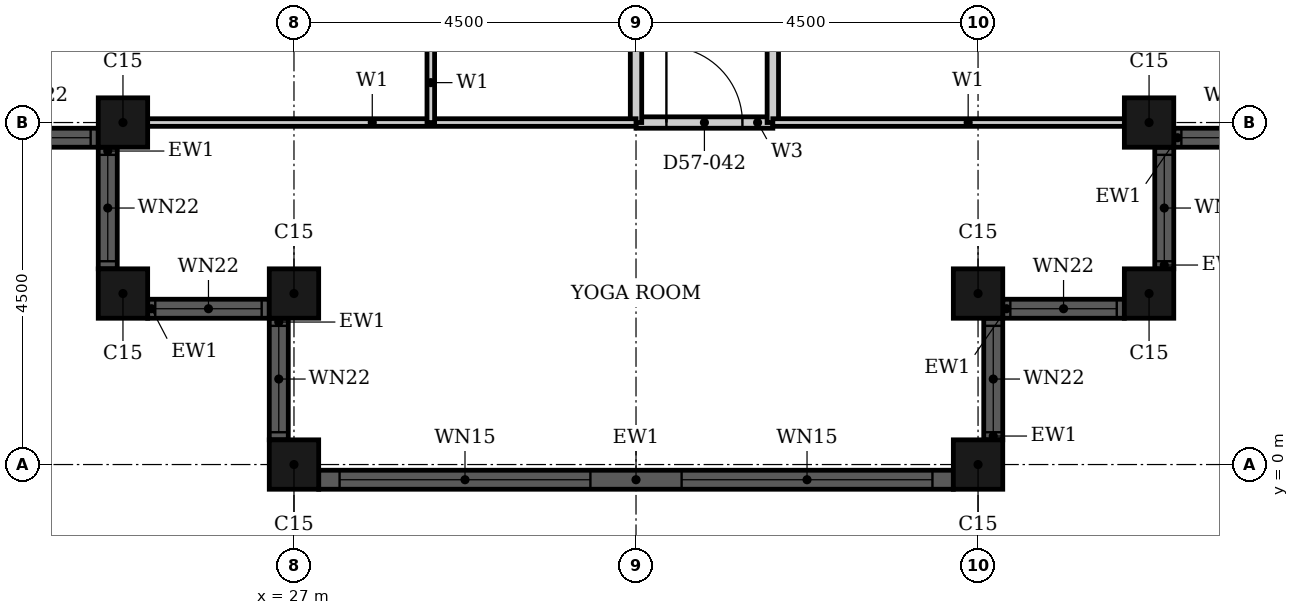
"""IFC4 building model, lengths in metres.
Left out: names, types, materials, properties, quantities, classifications, styles, units other than length and angle.
Written with IfcOpenShell. Run it as: python <this file> out.ifc"""

import sys

from ifc_helpers import new_model, si_unit, direction, frame, frame_2d, origin, origin_2d, place, context, subcontext, project, spatial, rectangle, hollow_rectangle, extrude, element, fill, save


model = new_model("IFC4")
c1 = context("Model", 3, precision=1e-05, world=origin(), true_north=direction((0.0, 1.0)))
c2 = subcontext(c1, "Body", "Model", "MODEL_VIEW")
j1 = project(units=[si_unit("LENGTHUNIT", "METRE"), si_unit("PLANEANGLEUNIT", "RADIAN")], contexts=[c1])
p1 = place(None, origin())
s1 = spatial("IfcSite", under=j1, at=p1, CompositionType="ELEMENT")
p2 = place(p1, origin())
s2 = spatial("IfcBuilding", under=s1, at=p2, CompositionType="ELEMENT")
p3 = place(p2, frame((0.0, 0.0, 225.7)))
s3 = spatial("IfcBuildingStorey", under=s2, at=p3, CompositionType="ELEMENT", Elevation=225.7)
for number, where, z_axis, x_axis in (
    (1, (24.75, 4.5, 0.0), (0.0, 0.0, 1.0), (1.0, 0.0, 0.0)),
    (2, (24.75, 2.25, 0.0), (0.0, 0.0, 1.0), (1.0, 0.0, 0.0)),
    (3, (27.0, 2.25, 0.0), (0.0, 0.0, 1.0), (1.0, 0.0, 0.0)),
    (4, (27.0, 0.0, 0.0), (0.0, 0.0, 1.0), (1.0, 0.0, 0.0)),
    (5, (36.0, 0.0, 0.0), (0.0, 0.0, 1.0), (1.0, 0.0, 0.0)),
    (6, (36.0, 2.25, 0.0), (0.0, 0.0, 1.0), (1.0, 0.0, 0.0)),
    (7, (38.25, 2.25, 0.0), (0.0, 0.0, 1.0), (1.0, 0.0, 0.0)),
    (8, (38.25, 4.5, 0.0), (0.0, 0.0, 1.0), (1.0, 0.0, 0.0)),
):
    element("IfcColumn", number, at=place(p3, frame(where, z_axis=z_axis, x_axis=x_axis)), inside=s3, PredefinedType="COLUMN", context=c2, shape_type="SweptSolid", body=[
        extrude(hollow_rectangle(XDim=0.65, YDim=0.65, WallThickness=0.021, at=origin_2d()), origin(), (0.0, 0.0, 1.0), 3.7),
    ])
p4 = place(p3, frame((22.825, 4.3, 0.0), z_axis=(0.0, 0.0, 1.0), x_axis=(1.0, 0.0, 0.0)))
e9 = element("IfcWall", 9, at=p4, inside=s3, PredefinedType="SOLIDWALL", context=c2, shape_type="SweptSolid", body=[
    extrude(rectangle(XDim=1.6, YDim=0.25, at=frame_2d((0.8, 0.0))), origin(), (0.0, 0.0, 1.0), 3.7),
])
p5 = place(p4, frame((0.1, 0.0, 0.9)))
e10 = element("IfcOpeningElement", 10, at=p5, cuts=e9, PredefinedType="OPENING", context=c2, shape_type="SweptSolid", body=[
    extrude(rectangle(XDim=1.4, YDim=1.85, at=frame_2d((0.7, 0.925))), frame((0.0, 0.135, 0.0), z_axis=(0.0, -1.0, 0.0), x_axis=(1.0, 0.0, 0.0)), (0.0, 0.0, 1.0), 0.27),
])
p6 = place(p3, frame((24.55, 4.175, 0.0), z_axis=(0.0, 0.0, 1.0), x_axis=(0.0, -1.0, 0.0)))
e11 = element("IfcWall", 11, at=p6, inside=s3, PredefinedType="SOLIDWALL", context=c2, shape_type="SweptSolid", body=[
    extrude(rectangle(XDim=1.6, YDim=0.25, at=frame_2d((0.8, 0.0))), origin(), (0.0, 0.0, 1.0), 3.7),
])
p7 = place(p6, frame((0.1, 0.0, 0.9)))
e12 = element("IfcOpeningElement", 12, at=p7, cuts=e11, PredefinedType="OPENING", context=c2, shape_type="SweptSolid", body=[
    extrude(rectangle(XDim=1.4, YDim=1.85, at=frame_2d((0.7, 0.925))), frame((0.0, 0.135, 0.0), z_axis=(0.0, -1.0, 0.0), x_axis=(1.0, 0.0, 0.0)), (0.0, 0.0, 1.0), 0.27),
])
p8 = place(p3, frame((25.075, 2.05, 0.0), z_axis=(0.0, 0.0, 1.0), x_axis=(1.0, 0.0, 0.0)))
e13 = element("IfcWall", 13, at=p8, inside=s3, PredefinedType="SOLIDWALL", context=c2, shape_type="SweptSolid", body=[
    extrude(rectangle(XDim=1.6, YDim=0.25, at=frame_2d((0.8, 0.0))), origin(), (0.0, 0.0, 1.0), 3.7),
])
p9 = place(p8, frame((0.1, 0.0, 0.9)))
e14 = element("IfcOpeningElement", 14, at=p9, cuts=e13, PredefinedType="OPENING", context=c2, shape_type="SweptSolid", body=[
    extrude(rectangle(XDim=1.4, YDim=1.85, at=frame_2d((0.7, 0.925))), frame((0.0, 0.135, 0.0), z_axis=(0.0, -1.0, 0.0), x_axis=(1.0, 0.0, 0.0)), (0.0, 0.0, 1.0), 0.27),
])
p10 = place(p3, frame((26.8, 1.925, 0.0), z_axis=(0.0, 0.0, 1.0), x_axis=(0.0, -1.0, 0.0)))
e15 = element("IfcWall", 15, at=p10, inside=s3, PredefinedType="SOLIDWALL", context=c2, shape_type="SweptSolid", body=[
    extrude(rectangle(XDim=1.6, YDim=0.25, at=frame_2d((0.8, 0.0))), origin(), (0.0, 0.0, 1.0), 3.7),
])
p11 = place(p10, frame((0.1, 0.0, 0.9)))
e16 = element("IfcOpeningElement", 16, at=p11, cuts=e15, PredefinedType="OPENING", context=c2, shape_type="SweptSolid", body=[
    extrude(rectangle(XDim=1.4, YDim=1.85, at=frame_2d((0.7, 0.925))), frame((0.0, 0.135, 0.0), z_axis=(0.0, -1.0, 0.0), x_axis=(1.0, 0.0, 0.0)), (0.0, 0.0, 1.0), 0.27),
])
p12 = place(p3, frame((27.325, -0.2, 0.0), z_axis=(0.0, 0.0, 1.0), x_axis=(1.0, 0.0, 0.0)))
e17 = element("IfcWall", 17, at=p12, inside=s3, PredefinedType="SOLIDWALL", context=c2, shape_type="SweptSolid", body=[
    extrude(rectangle(XDim=8.35, YDim=0.25, at=frame_2d((4.175, 0.0))), origin(), (0.0, 0.0, 1.0), 3.7),
])
p13 = place(p12, frame((0.275, 0.0, 0.45)))
e18 = element("IfcOpeningElement", 18, at=p13, cuts=e17, PredefinedType="OPENING", context=c2, shape_type="SweptSolid", body=[
    extrude(rectangle(XDim=3.3, YDim=2.3, at=frame_2d((1.65, 1.15))), frame((0.0, 0.135, 0.0), z_axis=(0.0, -1.0, 0.0), x_axis=(1.0, 0.0, 0.0)), (0.0, 0.0, 1.0), 0.27),
])
p14 = place(p12, frame((4.775, 0.0, 0.45)))
e19 = element("IfcOpeningElement", 19, at=p14, cuts=e17, PredefinedType="OPENING", context=c2, shape_type="SweptSolid", body=[
    extrude(rectangle(XDim=3.3, YDim=2.3, at=frame_2d((1.65, 1.15))), frame((0.0, 0.135, 0.0), z_axis=(0.0, -1.0, 0.0), x_axis=(1.0, 0.0, 0.0)), (0.0, 0.0, 1.0), 0.27),
])
p15 = place(p3, frame((36.2, 0.325, 0.0), z_axis=(0.0, 0.0, 1.0), x_axis=(0.0, 1.0, 0.0)))
e20 = element("IfcWall", 20, at=p15, inside=s3, PredefinedType="SOLIDWALL", context=c2, shape_type="SweptSolid", body=[
    extrude(rectangle(XDim=1.6, YDim=0.25, at=frame_2d((0.8, 0.0))), origin(), (0.0, 0.0, 1.0), 3.7),
])
p16 = place(p15, frame((0.1, 0.0, 0.9)))
e21 = element("IfcOpeningElement", 21, at=p16, cuts=e20, PredefinedType="OPENING", context=c2, shape_type="SweptSolid", body=[
    extrude(rectangle(XDim=1.4, YDim=1.85, at=frame_2d((0.7, 0.925))), frame((0.0, 0.135, 0.0), z_axis=(0.0, -1.0, 0.0), x_axis=(1.0, 0.0, 0.0)), (0.0, 0.0, 1.0), 0.27),
])
p17 = place(p3, frame((36.325, 2.05, 0.0), z_axis=(0.0, 0.0, 1.0), x_axis=(1.0, 0.0, 0.0)))
e22 = element("IfcWall", 22, at=p17, inside=s3, PredefinedType="SOLIDWALL", context=c2, shape_type="SweptSolid", body=[
    extrude(rectangle(XDim=1.6, YDim=0.25, at=frame_2d((0.8, 0.0))), origin(), (0.0, 0.0, 1.0), 3.7),
])
p18 = place(p17, frame((0.1, 0.0, 0.9)))
e23 = element("IfcOpeningElement", 23, at=p18, cuts=e22, PredefinedType="OPENING", context=c2, shape_type="SweptSolid", body=[
    extrude(rectangle(XDim=1.4, YDim=1.85, at=frame_2d((0.7, 0.925))), frame((0.0, 0.135, 0.0), z_axis=(0.0, -1.0, 0.0), x_axis=(1.0, 0.0, 0.0)), (0.0, 0.0, 1.0), 0.27),
])
p19 = place(p3, frame((38.45, 2.575, 0.0), z_axis=(0.0, 0.0, 1.0), x_axis=(0.0, 1.0, 0.0)))
e24 = element("IfcWall", 24, at=p19, inside=s3, PredefinedType="SOLIDWALL", context=c2, shape_type="SweptSolid", body=[
    extrude(rectangle(XDim=1.6, YDim=0.25, at=frame_2d((0.8, 0.0))), origin(), (0.0, 0.0, 1.0), 3.7),
])
p20 = place(p19, frame((0.1, 0.0, 0.9)))
e25 = element("IfcOpeningElement", 25, at=p20, cuts=e24, PredefinedType="OPENING", context=c2, shape_type="SweptSolid", body=[
    extrude(rectangle(XDim=1.4, YDim=1.85, at=frame_2d((0.7, 0.925))), frame((0.0, 0.135, 0.0), z_axis=(0.0, -1.0, 0.0), x_axis=(1.0, 0.0, 0.0)), (0.0, 0.0, 1.0), 0.27),
])
p21 = place(p3, frame((38.575, 4.3, 0.0), z_axis=(0.0, 0.0, 1.0), x_axis=(1.0, 0.0, 0.0)))
e26 = element("IfcWall", 26, at=p21, inside=s3, PredefinedType="SOLIDWALL", context=c2, shape_type="SweptSolid", body=[
    extrude(rectangle(XDim=1.6, YDim=0.25, at=frame_2d((0.8, 0.0))), origin(), (0.0, 0.0, 1.0), 3.7),
])
p22 = place(p21, frame((0.1, 0.0, 0.9)))
e27 = element("IfcOpeningElement", 27, at=p22, cuts=e26, PredefinedType="OPENING", context=c2, shape_type="SweptSolid", body=[
    extrude(rectangle(XDim=1.4, YDim=1.85, at=frame_2d((0.7, 0.925))), frame((0.0, 0.135, 0.0), z_axis=(0.0, -1.0, 0.0), x_axis=(1.0, 0.0, 0.0)), (0.0, 0.0, 1.0), 0.27),
])
p23 = place(p3, frame((31.5, 4.5, 0.0), z_axis=(0.0, 0.0, 1.0), x_axis=(1.0, 0.0, 0.0)))
e28 = element("IfcWall", 28, at=p23, inside=s3, PredefinedType="PARTITIONING", context=c2, shape_type="SweptSolid", body=[
    extrude(rectangle(XDim=1.8, YDim=0.15, at=frame_2d((0.9, 0.0))), origin(), (0.0, 0.0, 1.0), 3.4),
])
p24 = place(p23, frame((0.4, 0.0, 0.0)))
e29 = element("IfcOpeningElement", 29, at=p24, cuts=e28, PredefinedType="OPENING", context=c2, shape_type="SweptSolid", body=[
    extrude(rectangle(XDim=1.0, YDim=2.1, at=frame_2d((0.5, 1.05))), frame((0.0, 0.085, 0.0), z_axis=(0.0, -1.0, 0.0), x_axis=(1.0, 0.0, 0.0)), (0.0, 0.0, 1.0), 0.17),
])
p25 = place(p3, frame((31.5, 4.5, 0.0), z_axis=(0.0, 0.0, 1.0), x_axis=(0.0, 1.0, 0.0)))
e30 = element("IfcWall", 30, at=p25, inside=s3, PredefinedType="PARTITIONING", context=c2, shape_type="SweptSolid", body=[
    extrude(rectangle(XDim=6.6, YDim=0.15, at=frame_2d((3.3, 0.0))), origin(), (0.0, 0.0, 1.0), 2.68),
])
p26 = place(p25, frame((4.3, 0.0, 0.0)))
e31 = element("IfcOpeningElement", 31, at=p26, cuts=e30, PredefinedType="OPENING", context=c2, shape_type="SweptSolid", body=[
    extrude(rectangle(XDim=1.0, YDim=2.2, at=frame_2d((0.5, 1.1))), frame((0.0, 0.085, 0.0), z_axis=(0.0, -1.0, 0.0), x_axis=(1.0, 0.0, 0.0)), (0.0, 0.0, 1.0), 0.17),
])
p27 = place(p3, frame((33.3, 4.5, 0.0), z_axis=(0.0, 0.0, 1.0), x_axis=(0.0, 1.0, 0.0)))
e32 = element("IfcWall", 32, at=p27, inside=s3, PredefinedType="PARTITIONING", context=c2, shape_type="SweptSolid", body=[
    extrude(rectangle(XDim=16.199, YDim=0.15, at=frame_2d((8.1, 0.0))), origin(), (0.0, 0.0, 1.0), 3.4),
])
p28 = place(p27, frame((12.099, 0.0, 0.0)))
e33 = element("IfcOpeningElement", 33, at=p28, cuts=e32, PredefinedType="OPENING", context=c2, shape_type="SweptSolid", body=[
    extrude(rectangle(XDim=1.0, YDim=2.2, at=frame_2d((0.5, 1.1))), frame((0.0, 0.085, 0.0), z_axis=(0.0, -1.0, 0.0), x_axis=(1.0, 0.0, 0.0)), (0.0, 0.0, 1.0), 0.17),
])
p29 = place(p27, frame((4.0, 0.0, 0.0)))
e34 = element("IfcOpeningElement", 34, at=p29, cuts=e32, PredefinedType="OPENING", context=c2, shape_type="SweptSolid", body=[
    extrude(rectangle(XDim=1.0, YDim=2.1, at=frame_2d((0.5, 1.05))), frame((0.0, 0.085, 0.0), z_axis=(0.0, -1.0, 0.0), x_axis=(1.0, 0.0, 0.0)), (0.0, 0.0, 1.0), 0.17),
])
p30 = place(p3, frame((33.3, 4.5, 0.0), z_axis=(0.0, 0.0, 1.0), x_axis=(1.0, 0.0, 0.0)))
e35 = element("IfcWall", 35, at=p30, inside=s3, PredefinedType="PARTITIONING", context=c2, shape_type="SweptSolid", body=[
    extrude(rectangle(XDim=5.14, YDim=0.1, at=frame_2d((2.57, 0.0))), origin(), (0.0, 0.0, 1.0), 3.4),
])
p31 = place(p3, frame((24.56, 4.5, 0.0), z_axis=(0.0, 0.0, 1.0), x_axis=(1.0, 0.0, 0.0)))
e36 = element("IfcWall", 36, at=p31, inside=s3, PredefinedType="PARTITIONING", context=c2, shape_type="SweptSolid", body=[
    extrude(rectangle(XDim=6.94, YDim=0.1, at=frame_2d((3.47, 0.0))), origin(), (0.0, 0.0, 1.0), 3.4),
])
p32 = place(p3, frame((28.8, 4.5, 0.0), z_axis=(0.0, 0.0, 1.0), x_axis=(0.0, 1.0, 0.0)))
e37 = element("IfcWall", 37, at=p32, inside=s3, PredefinedType="PARTITIONING", context=c2, shape_type="SweptSolid", body=[
    extrude(rectangle(XDim=3.0, YDim=0.1, at=frame_2d((1.5, 0.0))), origin(), (0.0, 0.0, 1.0), 3.4),
])
p33 = place(p32, frame((1.05, 0.0, 0.0)))
e38 = element("IfcOpeningElement", 38, at=p33, cuts=e37, PredefinedType="OPENING", context=c2, shape_type="SweptSolid", body=[
    extrude(rectangle(XDim=0.9, YDim=2.1, at=frame_2d((0.45, 1.05))), frame((0.0, 0.06, 0.0), z_axis=(0.0, -1.0, 0.0), x_axis=(1.0, 0.0, 0.0)), (0.0, 0.0, 1.0), 0.12),
])
p34 = place(p5, origin())
e39 = element("IfcWindow", 39, at=p34, inside=s3, PartitioningType="SINGLE_PANEL", PredefinedType="WINDOW", context=c2, shape_type="SweptSolid", body=[
    extrude(rectangle(XDim=1.4, YDim=1.85, at=frame_2d((0.7, 0.925))), frame((0.0, 0.03, 0.0), z_axis=(0.0, -1.0, 0.0), x_axis=(1.0, 0.0, 0.0)), (0.0, 0.0, 1.0), 0.06),
])
fill(e10, e39)
p35 = place(p7, origin())
e40 = element("IfcWindow", 40, at=p35, inside=s3, PartitioningType="SINGLE_PANEL", PredefinedType="WINDOW", context=c2, shape_type="SweptSolid", body=[
    extrude(rectangle(XDim=1.4, YDim=1.85, at=frame_2d((0.7, 0.925))), frame((0.0, 0.03, 0.0), z_axis=(0.0, -1.0, 0.0), x_axis=(1.0, 0.0, 0.0)), (0.0, 0.0, 1.0), 0.06),
])
fill(e12, e40)
p36 = place(p9, origin())
e41 = element("IfcWindow", 41, at=p36, inside=s3, PartitioningType="SINGLE_PANEL", PredefinedType="WINDOW", context=c2, shape_type="SweptSolid", body=[
    extrude(rectangle(XDim=1.4, YDim=1.85, at=frame_2d((0.7, 0.925))), frame((0.0, 0.03, 0.0), z_axis=(0.0, -1.0, 0.0), x_axis=(1.0, 0.0, 0.0)), (0.0, 0.0, 1.0), 0.06),
])
fill(e14, e41)
p37 = place(p11, origin())
e42 = element("IfcWindow", 42, at=p37, inside=s3, PartitioningType="SINGLE_PANEL", PredefinedType="WINDOW", context=c2, shape_type="SweptSolid", body=[
    extrude(rectangle(XDim=1.4, YDim=1.85, at=frame_2d((0.7, 0.925))), frame((0.0, 0.03, 0.0), z_axis=(0.0, -1.0, 0.0), x_axis=(1.0, 0.0, 0.0)), (0.0, 0.0, 1.0), 0.06),
])
fill(e16, e42)
p38 = place(p13, origin())
e43 = element("IfcWindow", 43, at=p38, inside=s3, PartitioningType="SINGLE_PANEL", PredefinedType="WINDOW", context=c2, shape_type="SweptSolid", body=[
    extrude(rectangle(XDim=3.3, YDim=2.3, at=frame_2d((1.65, 1.15))), frame((0.0, 0.03, 0.0), z_axis=(0.0, -1.0, 0.0), x_axis=(1.0, 0.0, 0.0)), (0.0, 0.0, 1.0), 0.06),
])
fill(e18, e43)
p39 = place(p14, origin())
e44 = element("IfcWindow", 44, at=p39, inside=s3, PartitioningType="SINGLE_PANEL", PredefinedType="WINDOW", context=c2, shape_type="SweptSolid", body=[
    extrude(rectangle(XDim=3.3, YDim=2.3, at=frame_2d((1.65, 1.15))), frame((0.0, 0.03, 0.0), z_axis=(0.0, -1.0, 0.0), x_axis=(1.0, 0.0, 0.0)), (0.0, 0.0, 1.0), 0.06),
])
fill(e19, e44)
p40 = place(p16, origin())
e45 = element("IfcWindow", 45, at=p40, inside=s3, PartitioningType="SINGLE_PANEL", PredefinedType="WINDOW", context=c2, shape_type="SweptSolid", body=[
    extrude(rectangle(XDim=1.4, YDim=1.85, at=frame_2d((0.7, 0.925))), frame((0.0, 0.03, 0.0), z_axis=(0.0, -1.0, 0.0), x_axis=(1.0, 0.0, 0.0)), (0.0, 0.0, 1.0), 0.06),
])
fill(e21, e45)
p41 = place(p18, origin())
e46 = element("IfcWindow", 46, at=p41, inside=s3, PartitioningType="SINGLE_PANEL", PredefinedType="WINDOW", context=c2, shape_type="SweptSolid", body=[
    extrude(rectangle(XDim=1.4, YDim=1.85, at=frame_2d((0.7, 0.925))), frame((0.0, 0.03, 0.0), z_axis=(0.0, -1.0, 0.0), x_axis=(1.0, 0.0, 0.0)), (0.0, 0.0, 1.0), 0.06),
])
fill(e23, e46)
p42 = place(p20, origin())
e47 = element("IfcWindow", 47, at=p42, inside=s3, PartitioningType="SINGLE_PANEL", PredefinedType="WINDOW", context=c2, shape_type="SweptSolid", body=[
    extrude(rectangle(XDim=1.4, YDim=1.85, at=frame_2d((0.7, 0.925))), frame((0.0, 0.03, 0.0), z_axis=(0.0, -1.0, 0.0), x_axis=(1.0, 0.0, 0.0)), (0.0, 0.0, 1.0), 0.06),
])
fill(e25, e47)
p43 = place(p22, origin())
e48 = element("IfcWindow", 48, at=p43, inside=s3, PartitioningType="SINGLE_PANEL", PredefinedType="WINDOW", context=c2, shape_type="SweptSolid", body=[
    extrude(rectangle(XDim=1.4, YDim=1.85, at=frame_2d((0.7, 0.925))), frame((0.0, 0.03, 0.0), z_axis=(0.0, -1.0, 0.0), x_axis=(1.0, 0.0, 0.0)), (0.0, 0.0, 1.0), 0.06),
])
fill(e27, e48)
p44 = place(p24, origin())
e49 = element("IfcDoor", 49, at=p44, inside=s3, OperationType="SINGLE_SWING_LEFT", PredefinedType="DOOR", context=c2, shape_type="SweptSolid", body=[
    extrude(rectangle(XDim=1.0, YDim=2.1, at=frame_2d((0.5, 1.05))), frame((0.0, 0.025, 0.0), z_axis=(0.0, -1.0, 0.0), x_axis=(1.0, 0.0, 0.0)), (0.0, 0.0, 1.0), 0.05),
])
fill(e29, e49)
save(model, sys.argv[1])
